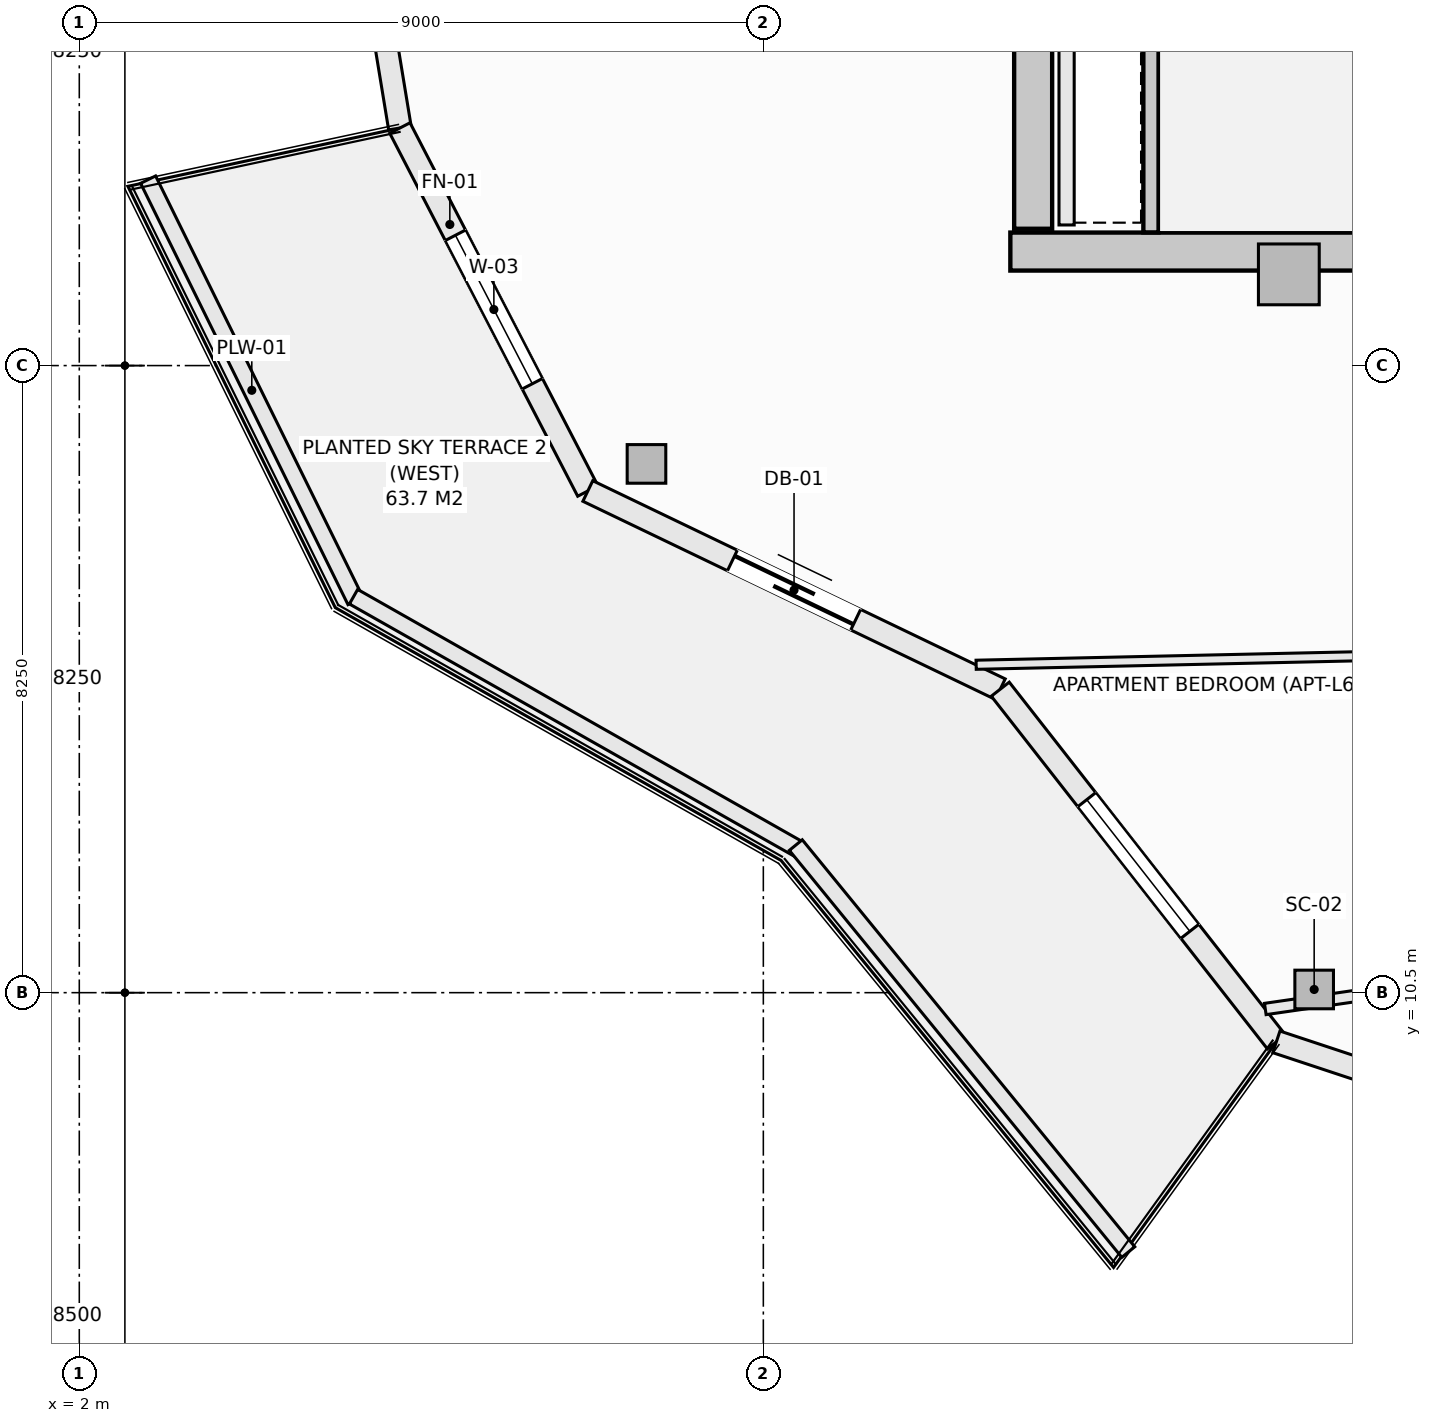
"""IFC4 building model, lengths in metres.
Left out: names, types, materials, properties, quantities, classifications, styles, units other than length and angle.
Written with IfcOpenShell. Run it as: python <this file> out.ifc"""

import sys

from ifc_helpers import new_model, si_unit, direction, frame, frame_2d, origin, origin_2d, place, context, subcontext, project, spatial, rectangle, hollow_rectangle, extrude, element, fill, save


model = new_model("IFC4")
c1 = context("Model", 3, precision=1e-05, world=origin(), true_north=direction((0.0, 1.0)))
c2 = subcontext(c1, "Body", "Model", "MODEL_VIEW")
j1 = project(units=[si_unit("LENGTHUNIT", "METRE"), si_unit("PLANEANGLEUNIT", "RADIAN")], contexts=[c1])
p1 = place(None, origin())
s1 = spatial("IfcSite", under=j1, at=p1, CompositionType="ELEMENT")
p2 = place(p1, origin())
s2 = spatial("IfcBuilding", under=s1, at=p2, CompositionType="ELEMENT")
p3 = place(p2, frame((0.0, 0.0, 232.7)))
s3 = spatial("IfcBuildingStorey", under=s2, at=p3, CompositionType="ELEMENT", Elevation=232.7)
p4 = place(p3, frame((14.25, 20.25, -0.27), z_axis=(0.0, 0.0, 1.0), x_axis=(1.0, 0.0, 0.0)))
e1 = element("IfcWall", 1, at=p4, inside=s3, PredefinedType="SHEAR", context=c2, shape_type="SweptSolid", body=[
    extrude(rectangle(XDim=13.5, YDim=0.5, at=frame_2d((6.75, 0.0))), origin(), (0.0, 0.0, 1.0), 3.3),
])
p5 = place(p3, frame((14.55, 20.55, -0.27), z_axis=(0.0, 0.0, 1.0), x_axis=(0.0, 1.0, 0.0)))
e2 = element("IfcWall", 2, at=p5, inside=s3, PredefinedType="SHEAR", context=c2, shape_type="SweptSolid", body=[
    extrude(rectangle(XDim=12.9, YDim=0.5, at=frame_2d((6.45, 0.0))), origin(), (0.0, 0.0, 1.0), 3.3),
])
for number, where, z_axis, x_axis in (
    (3, (9.463, 17.456, -0.27), (0.0, 0.0, 1.0), (1.0, 0.0, 0.0)),
    (4, (18.247, 10.542, -0.27), (0.0, 0.0, 1.0), (1.0, 0.0, 0.0)),
):
    element("IfcColumn", number, at=place(p3, frame(where, z_axis=z_axis, x_axis=x_axis)), inside=s3, PredefinedType="COLUMN", context=c2, shape_type="SweptSolid", body=[
        extrude(hollow_rectangle(XDim=0.508, YDim=0.508, WallThickness=0.019, at=origin_2d()), origin(), (0.0, 0.0, 1.0), 3.3),
    ])
p6 = place(p3, frame((17.914, 19.95, -0.27), z_axis=(0.0, 0.0, 1.0), x_axis=(1.0, 0.0, 0.0)))
e5 = element("IfcColumn", 5, at=p6, inside=s3, PredefinedType="PILASTER", context=c2, shape_type="SweptSolid", body=[
    extrude(rectangle(XDim=0.8, YDim=0.8, at=origin_2d()), origin(), (0.0, 0.0, 1.0), 3.3),
])
p7 = place(p3, frame((5.375, 27.0, 0.0), z_axis=(0.0, 0.0, 1.0), x_axis=(0.16237087798, -0.986729799886, 0.0)))
e6 = element("IfcWall", 6, at=p7, inside=s3, PredefinedType="SOLIDWALL", context=c2, shape_type="SweptSolid", body=[
    extrude(rectangle(XDim=5.193, YDim=0.3, at=frame_2d((2.597, 0.0))), origin(), (0.0, 0.0, 1.0), 2.605),
])
p8 = place(p7, frame((1.497, 0.0, 0.72)))
e7 = element("IfcOpeningElement", 7, at=p8, cuts=e6, PredefinedType="OPENING", context=c2, shape_type="SweptSolid", body=[
    extrude(rectangle(XDim=2.2, YDim=1.65, at=frame_2d((1.1, 0.825))), frame((0.0, 0.16, 0.0), z_axis=(0.0, -1.0, 0.0), x_axis=(1.0, 0.0, 0.0)), (0.0, 0.0, 1.0), 0.32),
])
p9 = place(p3, frame((6.218, 21.875, 0.0), z_axis=(0.0, 0.0, 1.0), x_axis=(0.459808219482, -0.888018243786, 0.0)))
e8 = element("IfcWall", 8, at=p9, inside=s3, PredefinedType="SOLIDWALL", context=c2, shape_type="SweptSolid", body=[
    extrude(rectangle(XDim=5.378, YDim=0.3, at=frame_2d((2.689, 0.0))), origin(), (0.0, 0.0, 1.0), 2.605),
])
p10 = place(p9, frame((1.589, 0.0, 0.72)))
e9 = element("IfcOpeningElement", 9, at=p10, cuts=e8, PredefinedType="OPENING", context=c2, shape_type="SweptSolid", body=[
    extrude(rectangle(XDim=2.2, YDim=1.65, at=frame_2d((1.1, 0.825))), frame((0.0, 0.16, 0.0), z_axis=(0.0, -1.0, 0.0), x_axis=(1.0, 0.0, 0.0)), (0.0, 0.0, 1.0), 0.32),
])
p11 = place(p3, frame((8.691, 17.1, 0.0), z_axis=(0.0, 0.0, 1.0), x_axis=(0.901348331142, -0.433094892545, 0.0)))
e10 = element("IfcWall", 10, at=p11, inside=s3, PredefinedType="SOLIDWALL", context=c2, shape_type="SweptSolid", body=[
    extrude(rectangle(XDim=6.021, YDim=0.3, at=frame_2d((3.01, 0.0))), origin(), (0.0, 0.0, 1.0), 2.605),
])
p12 = place(p11, frame((2.11, 0.0, 0.0)))
e11 = element("IfcOpeningElement", 11, at=p12, cuts=e10, PredefinedType="OPENING", context=c2, shape_type="SweptSolid", body=[
    extrude(rectangle(XDim=1.8, YDim=2.25, at=frame_2d((0.9, 1.125))), frame((0.0, 0.16, 0.0), z_axis=(0.0, -1.0, 0.0), x_axis=(1.0, 0.0, 0.0)), (0.0, 0.0, 1.0), 0.32),
])
p13 = place(p3, frame((14.117, 14.493, 0.0), z_axis=(0.0, 0.0, 1.0), x_axis=(0.616450126935, -0.787393955401, 0.0)))
e12 = element("IfcWall", 12, at=p13, inside=s3, PredefinedType="SOLIDWALL", context=c2, shape_type="SweptSolid", body=[
    extrude(rectangle(XDim=5.893, YDim=0.3, at=frame_2d((2.946, 0.0))), origin(), (0.0, 0.0, 1.0), 2.605),
])
p14 = place(p13, frame((1.846, 0.0, 0.72)))
e13 = element("IfcOpeningElement", 13, at=p14, cuts=e12, PredefinedType="OPENING", context=c2, shape_type="SweptSolid", body=[
    extrude(rectangle(XDim=2.2, YDim=1.65, at=frame_2d((1.1, 0.825))), frame((0.0, 0.16, 0.0), z_axis=(0.0, -1.0, 0.0), x_axis=(1.0, 0.0, 0.0)), (0.0, 0.0, 1.0), 0.32),
])
p15 = place(p3, frame((17.75, 9.853, 0.0), z_axis=(0.0, 0.0, 1.0), x_axis=(0.949240877604, -0.314550085495, 0.0)))
e14 = element("IfcWall", 14, at=p15, inside=s3, PredefinedType="SOLIDWALL", context=c2, shape_type="SweptSolid", body=[
    extrude(rectangle(XDim=6.288, YDim=0.3, at=frame_2d((3.144, 0.0))), origin(), (0.0, 0.0, 1.0), 2.605),
])
p16 = place(p15, frame((2.044, 0.0, 0.72)))
e15 = element("IfcOpeningElement", 15, at=p16, cuts=e14, PredefinedType="OPENING", context=c2, shape_type="SweptSolid", body=[
    extrude(rectangle(XDim=2.2, YDim=1.65, at=frame_2d((1.1, 0.825))), frame((0.0, 0.16, 0.0), z_axis=(0.0, -1.0, 0.0), x_axis=(1.0, 0.0, 0.0)), (0.0, 0.0, 1.0), 0.32),
])
p17 = place(p3, frame((2.906, 21.196, 0.0), z_axis=(0.0, 0.0, 1.0), x_axis=(0.441640961804, -0.897191875162, 0.0)))
e16 = element("IfcWall", 16, at=p17, inside=s3, PredefinedType="PARAPET", context=c2, shape_type="SweptSolid", body=[
    extrude(rectangle(XDim=6.178, YDim=0.22, at=frame_2d((3.089, 0.0))), origin(), (0.0, 0.0, 1.0), 0.52),
])
p18 = place(p3, frame((5.608, 15.709, 0.0), z_axis=(0.0, 0.0, 1.0), x_axis=(0.869860619267, -0.493297580623, 0.0)))
e17 = element("IfcWall", 17, at=p18, inside=s3, PredefinedType="PARAPET", context=c2, shape_type="SweptSolid", body=[
    extrude(rectangle(XDim=6.743, YDim=0.22, at=frame_2d((3.371, 0.0))), origin(), (0.0, 0.0, 1.0), 0.52),
])
p19 = place(p3, frame((11.427, 12.441, 0.0), z_axis=(0.0, 0.0, 1.0), x_axis=(0.632697312147, -0.774399193699, 0.0)))
e18 = element("IfcWall", 18, at=p19, inside=s3, PredefinedType="PARAPET", context=c2, shape_type="SweptSolid", body=[
    extrude(rectangle(XDim=6.914, YDim=0.22, at=frame_2d((3.457, 0.0))), origin(), (0.0, 0.0, 1.0), 0.52),
])
p20 = place(p3, frame((16.1, 20.502, -0.27), z_axis=(0.0, 0.0, 1.0), x_axis=(0.0, 1.0, 0.0)))
e19 = element("IfcWall", 19, at=p20, inside=s3, PredefinedType="SHEAR", context=c2, shape_type="SweptSolid", body=[
    extrude(rectangle(XDim=3.036, YDim=0.2, at=frame_2d((1.518, 0.0))), origin(), (0.0, 0.0, 1.0), 3.3),
])
p21 = place(p3, frame((14.99, 20.6, 0.0), z_axis=(0.0, 0.0, 1.0), x_axis=(0.0, 1.0, 0.0)))
e20 = element("IfcWall", 20, at=p21, inside=s3, PredefinedType="SOLIDWALL", context=c2, shape_type="SweptSolid", body=[
    extrude(rectangle(XDim=2.85, YDim=0.2, at=frame_2d((1.425, 0.0))), origin(), (0.0, 0.0, 1.0), 3.03),
])
p22 = place(p3, frame((13.8, 14.814, 0.0), z_axis=(0.0, 0.0, 1.0), x_axis=(0.999752677802, 0.022239227231, 0.0)))
e21 = element("IfcWall", 21, at=p22, inside=s3, PredefinedType="PARTITIONING", context=c2, shape_type="SweptSolid", body=[
    extrude(rectangle(XDim=13.261, YDim=0.12, at=frame_2d((6.631, 0.0))), origin(), (0.0, 0.0, 1.0), 2.478),
])
p23 = place(p3, frame((17.604, 10.285, 0.0), z_axis=(0.0, 0.0, 1.0), x_axis=(0.989781675617, 0.142591144933, 0.0)))
e22 = element("IfcWall", 22, at=p23, inside=s3, PredefinedType="PARTITIONING", context=c2, shape_type="SweptSolid", body=[
    extrude(rectangle(XDim=9.612, YDim=0.15, at=frame_2d((4.806, 0.0))), origin(), (0.0, 0.0, 1.0), 2.605),
])
p24 = place(p10, origin())
e23 = element("IfcWindow", 23, at=p24, inside=s3, PartitioningType="SINGLE_PANEL", PredefinedType="WINDOW", context=c2, shape_type="SweptSolid", body=[
    extrude(rectangle(XDim=2.2, YDim=1.65, at=frame_2d((1.1, 0.825))), frame((0.0, 0.03, 0.0), z_axis=(0.0, -1.0, 0.0), x_axis=(1.0, 0.0, 0.0)), (0.0, 0.0, 1.0), 0.06),
])
fill(e9, e23)
p25 = place(p12, frame((1.8, 0.0, 0.0), z_axis=(0.0, 0.0, 1.0), x_axis=(-1.0, 0.0, 0.0)))
e24 = element("IfcDoor", 24, at=p25, inside=s3, OperationType="SLIDING_TO_LEFT", PredefinedType="DOOR", context=c2, shape_type="SweptSolid", body=[
    extrude(rectangle(XDim=1.8, YDim=2.25, at=frame_2d((0.9, 1.125))), frame((0.0, 0.025, 0.0), z_axis=(0.0, -1.0, 0.0), x_axis=(1.0, 0.0, 0.0)), (0.0, 0.0, 1.0), 0.05),
])
fill(e11, e24)
p26 = place(p14, origin())
e25 = element("IfcWindow", 25, at=p26, inside=s3, PartitioningType="SINGLE_PANEL", PredefinedType="WINDOW", context=c2, shape_type="SweptSolid", body=[
    extrude(rectangle(XDim=2.2, YDim=1.65, at=frame_2d((1.1, 0.825))), frame((0.0, 0.03, 0.0), z_axis=(0.0, -1.0, 0.0), x_axis=(1.0, 0.0, 0.0)), (0.0, 0.0, 1.0), 0.06),
])
fill(e13, e25)
save(model, sys.argv[1])
